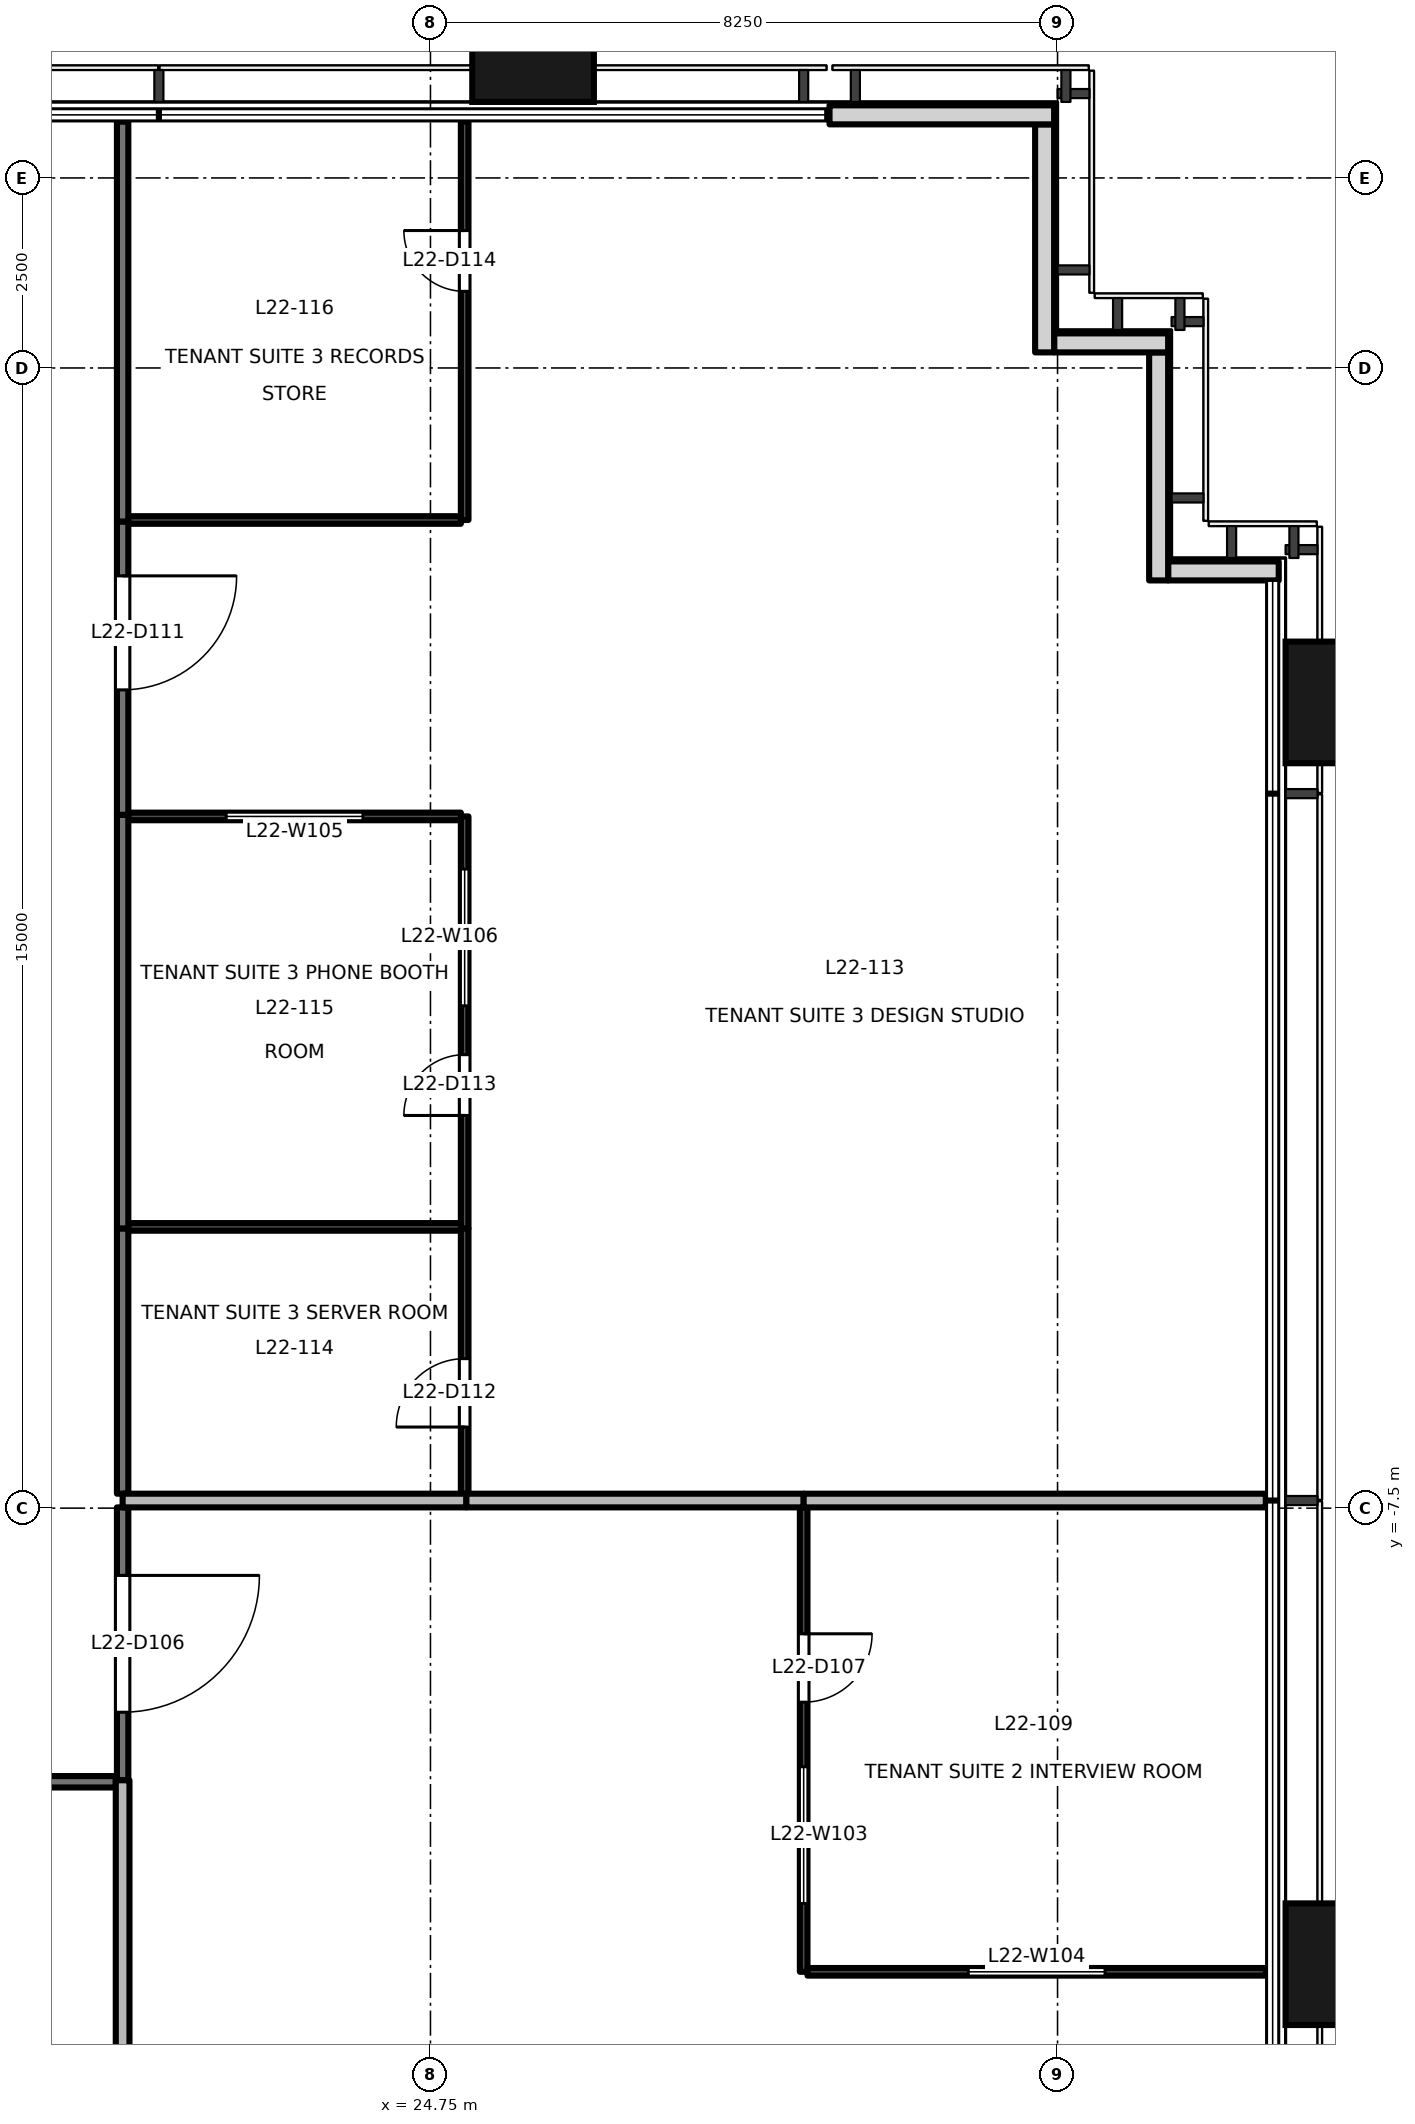
"""IFC4 building model, lengths in metres.
Left out: names, types, materials, properties, quantities, classifications, styles, units other than length and angle.
Written with IfcOpenShell. Run it as: python <this file> out.ifc"""

import sys

from ifc_helpers import new_model, si_unit, direction, frame, frame_2d, origin, origin_2d, place, context, subcontext, project, spatial, rectangle, extrude, element, fill, save


model = new_model("IFC4")
c1 = context("Model", 3, precision=1e-05, world=origin(), true_north=direction((0.0, 1.0)))
c2 = subcontext(c1, "Body", "Model", "MODEL_VIEW")
j1 = project(units=[si_unit("LENGTHUNIT", "METRE"), si_unit("PLANEANGLEUNIT", "RADIAN")], contexts=[c1])
p1 = place(None, origin())
s1 = spatial("IfcSite", under=j1, at=p1, CompositionType="ELEMENT")
p2 = place(p1, origin())
s2 = spatial("IfcBuilding", under=s1, at=p2, CompositionType="ELEMENT")
p3 = place(p2, frame((0.0, 0.0, 99.7)))
s3 = spatial("IfcBuildingStorey", under=s2, at=p3, CompositionType="ELEMENT", Elevation=99.7)
for number, where, z_axis, x_axis in (
    (1, (36.9, -13.5, -0.2), (0.0, 0.0, 1.0), (0.0, 1.0, 0.0)),
    (2, (36.9, 3.1, -0.2), (0.0, 0.0, 1.0), (0.0, 1.0, 0.0)),
    (3, (26.1, 11.9, -0.2), (0.0, 0.0, 1.0), (1.0, 0.0, 0.0)),
):
    element("IfcColumn", number, at=place(p3, frame(where, z_axis=z_axis, x_axis=x_axis)), inside=s3, PredefinedType="COLUMN", context=c2, shape_type="SweptSolid", body=[
        extrude(rectangle(XDim=1.6, YDim=1.8, at=origin_2d()), origin(), (0.0, 0.0, 1.0), 4.0),
    ])
p4 = place(p3, frame((35.91, 4.83, 0.0), z_axis=(0.0, 0.0, 1.0), x_axis=(-1.0, 0.0, 0.0)))
e4 = element("IfcWall", 4, at=p4, inside=s3, PredefinedType="SOLIDWALL", context=c2, shape_type="SweptSolid", body=[
    extrude(rectangle(XDim=1.455, YDim=0.25, at=frame_2d((0.728, 0.0))), origin(), (0.0, 0.0, 1.0), 3.8),
])
p5 = place(p3, frame((34.33, 4.705, 0.0), z_axis=(0.0, 0.0, 1.0), x_axis=(0.0, 1.0, 0.0)))
e5 = element("IfcWall", 5, at=p5, inside=s3, PredefinedType="SOLIDWALL", context=c2, shape_type="SweptSolid", body=[
    extrude(rectangle(XDim=3.0, YDim=0.25, at=frame_2d((1.5, 0.0))), origin(), (0.0, 0.0, 1.0), 3.8),
])
p6 = place(p3, frame((34.455, 7.83, 0.0), z_axis=(0.0, 0.0, 1.0), x_axis=(-1.0, 0.0, 0.0)))
e6 = element("IfcWall", 6, at=p6, inside=s3, PredefinedType="SOLIDWALL", context=c2, shape_type="SweptSolid", body=[
    extrude(rectangle(XDim=1.5, YDim=0.25, at=frame_2d((0.75, 0.0))), origin(), (0.0, 0.0, 1.0), 3.8),
])
p7 = place(p3, frame((32.83, 7.705, 0.0), z_axis=(0.0, 0.0, 1.0), x_axis=(0.0, 1.0, 0.0)))
e7 = element("IfcWall", 7, at=p7, inside=s3, PredefinedType="SOLIDWALL", context=c2, shape_type="SweptSolid", body=[
    extrude(rectangle(XDim=3.0, YDim=0.25, at=frame_2d((1.5, 0.0))), origin(), (0.0, 0.0, 1.0), 3.8),
])
p8 = place(p3, frame((32.955, 10.83, 0.0), z_axis=(0.0, 0.0, 1.0), x_axis=(-1.0, 0.0, 0.0)))
e8 = element("IfcWall", 8, at=p8, inside=s3, PredefinedType="SOLIDWALL", context=c2, shape_type="SweptSolid", body=[
    extrude(rectangle(XDim=2.955, YDim=0.25, at=frame_2d((1.478, 0.0))), origin(), (0.0, 0.0, 1.0), 3.8),
])
p9 = place(p3, frame((20.7, -7.49, 0.0), z_axis=(0.0, 0.0, 1.0), x_axis=(0.0, -1.0, 0.0)))
e9 = element("IfcWall", 9, at=p9, inside=s3, PredefinedType="PARTITIONING", context=c2, shape_type="SweptSolid", body=[
    extrude(rectangle(XDim=3.59, YDim=0.15, at=frame_2d((1.795, 0.0))), origin(), (0.0, 0.0, 1.0), 2.9),
])
p10 = place(p9, frame((0.895, 0.0, 0.0)))
e10 = element("IfcOpeningElement", 10, at=p10, cuts=e9, PredefinedType="OPENING", context=c2, shape_type="SweptSolid", body=[
    extrude(rectangle(XDim=1.8, YDim=2.1, at=frame_2d((0.9, 1.05))), frame((0.0, 0.085, 0.0), z_axis=(0.0, -1.0, 0.0), x_axis=(1.0, 0.0, 0.0)), (0.0, 0.0, 1.0), 0.171),
])
p11 = place(p3, frame((20.7, 5.48, 0.0), z_axis=(0.0, 0.0, 1.0), x_axis=(0.0, -1.0, 0.0)))
e11 = element("IfcWall", 11, at=p11, inside=s3, PredefinedType="PARTITIONING", context=c2, shape_type="SweptSolid", body=[
    extrude(rectangle(XDim=3.86, YDim=0.15, at=frame_2d((1.93, 0.0))), origin(), (0.0, 0.0, 1.0), 2.9),
])
p12 = place(p11, frame((0.715, 0.0, 0.0)))
e12 = element("IfcOpeningElement", 12, at=p12, cuts=e11, PredefinedType="OPENING", context=c2, shape_type="SweptSolid", body=[
    extrude(rectangle(XDim=1.5, YDim=2.1, at=frame_2d((0.75, 1.05))), frame((0.0, 0.085, 0.0), z_axis=(0.0, -1.0, 0.0), x_axis=(1.0, 0.0, 0.0)), (0.0, 0.0, 1.0), 0.171),
])
p13 = place(p3, frame((20.7, -3.82, 0.0), z_axis=(0.0, 0.0, 1.0), x_axis=(0.0, -1.0, 0.0)))
e13 = element("IfcWall", 13, at=p13, inside=s3, PredefinedType="PARTITIONING", context=c2, shape_type="SweptSolid", body=[
    extrude(rectangle(XDim=3.49, YDim=0.15, at=frame_2d((1.745, 0.0))), origin(), (0.0, 0.0, 1.0), 2.9),
])
p14 = place(p3, frame((20.7, 1.62, 0.0), z_axis=(0.0, 0.0, 1.0), x_axis=(0.0, -1.0, 0.0)))
e14 = element("IfcWall", 14, at=p14, inside=s3, PredefinedType="PARTITIONING", context=c2, shape_type="SweptSolid", body=[
    extrude(rectangle(XDim=5.44, YDim=0.15, at=frame_2d((2.72, 0.0))), origin(), (0.0, 0.0, 1.0), 2.9),
])
p15 = place(p3, frame((20.7, 10.74, 0.0), z_axis=(0.0, 0.0, 1.0), x_axis=(0.0, -1.0, 0.0)))
e15 = element("IfcWall", 15, at=p15, inside=s3, PredefinedType="PARTITIONING", context=c2, shape_type="SweptSolid", body=[
    extrude(rectangle(XDim=5.26, YDim=0.15, at=frame_2d((2.63, 0.0))), origin(), (0.0, 0.0, 1.0), 3.8),
])
p16 = place(p3, frame((20.61, -11.1, 0.0), z_axis=(0.0, 0.0, 1.0), x_axis=(-1.0, 0.0, 0.0)))
e16 = element("IfcWall", 16, at=p16, inside=s3, PredefinedType="PARTITIONING", context=c2, shape_type="SweptSolid", body=[
    extrude(rectangle(XDim=8.63, YDim=0.15, at=frame_2d((4.315, 0.0))), origin(), (0.0, 0.0, 1.0), 2.4),
])
p17 = place(p3, frame((29.66, -7.49, 0.0), z_axis=(0.0, 0.0, 1.0), x_axis=(0.0, -1.0, 0.0)))
e17 = element("IfcWall", 17, at=p17, inside=s3, PredefinedType="PARTITIONING", context=c2, shape_type="SweptSolid", body=[
    extrude(rectangle(XDim=6.11, YDim=0.1, at=frame_2d((3.055, 0.0))), origin(), (0.0, 0.0, 1.0), 2.9),
])
p18 = place(p17, frame((1.663, 0.0, 0.0)))
e18 = element("IfcOpeningElement", 18, at=p18, cuts=e17, PredefinedType="OPENING", context=c2, shape_type="SweptSolid", body=[
    extrude(rectangle(XDim=0.9, YDim=2.1, at=frame_2d((0.45, 1.05))), frame((0.0, 0.061, 0.0), z_axis=(0.0, -1.0, 0.0), x_axis=(1.0, 0.0, 0.0)), (0.0, 0.0, 1.0), 0.121),
])
p19 = place(p17, frame((3.412, 0.0, 0.9)))
e19 = element("IfcOpeningElement", 19, at=p19, cuts=e17, PredefinedType="OPENING", context=c2, shape_type="SweptSolid", body=[
    extrude(rectangle(XDim=1.8, YDim=1.2, at=frame_2d((0.9, 0.6))), frame((0.0, 0.061, 0.0), z_axis=(0.0, -1.0, 0.0), x_axis=(1.0, 0.0, 0.0)), (0.0, 0.0, 1.0), 0.121),
])
p20 = place(p3, frame((29.71, -13.6, 0.0), z_axis=(0.0, 0.0, 1.0), x_axis=(1.0, 0.0, 0.0)))
e20 = element("IfcWall", 20, at=p20, inside=s3, PredefinedType="PARTITIONING", context=c2, shape_type="SweptSolid", body=[
    extrude(rectangle(XDim=6.03, YDim=0.1, at=frame_2d((3.015, 0.0))), origin(), (0.0, 0.0, 1.0), 2.9),
])
p21 = place(p20, frame((2.115, 0.0, 0.9)))
e21 = element("IfcOpeningElement", 21, at=p21, cuts=e20, PredefinedType="OPENING", context=c2, shape_type="SweptSolid", body=[
    extrude(rectangle(XDim=1.8, YDim=1.2, at=frame_2d((0.9, 0.6))), frame((0.0, 0.061, 0.0), z_axis=(0.0, -1.0, 0.0), x_axis=(1.0, 0.0, 0.0)), (0.0, 0.0, 1.0), 0.121),
])
p22 = place(p3, frame((25.22, -7.4, 0.0), z_axis=(0.0, 0.0, 1.0), x_axis=(1.0, 0.0, 0.0)))
e22 = element("IfcWall", 22, at=p22, inside=s3, PredefinedType="PARTITIONING", context=c2, shape_type="SweptSolid", body=[
    extrude(rectangle(XDim=4.44, YDim=0.18, at=frame_2d((2.22, 0.0))), origin(), (0.0, 0.0, 1.0), 3.8),
])
p23 = place(p3, frame((20.7, -7.4, 0.0), z_axis=(0.0, 0.0, 1.0), x_axis=(1.0, 0.0, 0.0)))
e23 = element("IfcWall", 23, at=p23, inside=s3, PredefinedType="PARTITIONING", context=c2, shape_type="SweptSolid", body=[
    extrude(rectangle(XDim=4.52, YDim=0.18, at=frame_2d((2.26, 0.0))), origin(), (0.0, 0.0, 1.0), 3.8),
])
p24 = place(p3, frame((20.7, -15.92, 0.0), z_axis=(0.0, 0.0, 1.0), x_axis=(0.0, 1.0, 0.0)))
e24 = element("IfcWall", 24, at=p24, inside=s3, PredefinedType="PARTITIONING", context=c2, shape_type="SweptSolid", body=[
    extrude(rectangle(XDim=4.84, YDim=0.18, at=frame_2d((2.42, 0.0))), origin(), (0.0, 0.0, 1.0), 2.9),
])
p25 = place(p3, frame((29.66, -7.4, 0.0), z_axis=(0.0, 0.0, 1.0), x_axis=(1.0, 0.0, 0.0)))
e25 = element("IfcWall", 25, at=p25, inside=s3, PredefinedType="PARTITIONING", context=c2, shape_type="SweptSolid", body=[
    extrude(rectangle(XDim=6.08, YDim=0.18, at=frame_2d((3.04, 0.0))), origin(), (0.0, 0.0, 1.0), 3.8),
])
p26 = place(p3, frame((25.2, -7.31, 0.0), z_axis=(0.0, 0.0, 1.0), x_axis=(0.0, 1.0, 0.0)))
e26 = element("IfcWall", 26, at=p26, inside=s3, PredefinedType="PARTITIONING", context=c2, shape_type="SweptSolid", body=[
    extrude(rectangle(XDim=3.49, YDim=0.1, at=frame_2d((1.745, 0.0))), origin(), (0.0, 0.0, 1.0), 2.9),
])
p27 = place(p26, frame((0.877, 0.0, 0.0)))
e27 = element("IfcOpeningElement", 27, at=p27, cuts=e26, PredefinedType="OPENING", context=c2, shape_type="SweptSolid", body=[
    extrude(rectangle(XDim=0.9, YDim=2.1, at=frame_2d((0.45, 1.05))), frame((0.0, 0.061, 0.0), z_axis=(0.0, -1.0, 0.0), x_axis=(1.0, 0.0, 0.0)), (0.0, 0.0, 1.0), 0.121),
])
p28 = place(p3, frame((25.15, 1.6, 0.0), z_axis=(0.0, 0.0, 1.0), x_axis=(-1.0, 0.0, 0.0)))
e28 = element("IfcWall", 28, at=p28, inside=s3, PredefinedType="PARTITIONING", context=c2, shape_type="SweptSolid", body=[
    extrude(rectangle(XDim=4.375, YDim=0.1, at=frame_2d((2.188, 0.0))), origin(), (0.0, 0.0, 1.0), 3.8),
])
p29 = place(p28, frame((1.288, 0.0, 0.9)))
e29 = element("IfcOpeningElement", 29, at=p29, cuts=e28, PredefinedType="OPENING", context=c2, shape_type="SweptSolid", body=[
    extrude(rectangle(XDim=1.8, YDim=1.2, at=frame_2d((0.9, 0.6))), frame((0.0, 0.061, 0.0), z_axis=(0.0, -1.0, 0.0), x_axis=(1.0, 0.0, 0.0)), (0.0, 0.0, 1.0), 0.121),
])
p30 = place(p3, frame((25.2, -3.82, 0.0), z_axis=(0.0, 0.0, 1.0), x_axis=(0.0, 1.0, 0.0)))
e30 = element("IfcWall", 30, at=p30, inside=s3, PredefinedType="PARTITIONING", context=c2, shape_type="SweptSolid", body=[
    extrude(rectangle(XDim=5.42, YDim=0.1, at=frame_2d((2.71, 0.0))), origin(), (0.0, 0.0, 1.0), 2.9),
])
p31 = place(p30, frame((1.486, 0.0, 0.0)))
e31 = element("IfcOpeningElement", 31, at=p31, cuts=e30, PredefinedType="OPENING", context=c2, shape_type="SweptSolid", body=[
    extrude(rectangle(XDim=0.8, YDim=2.1, at=frame_2d((0.4, 1.05))), frame((0.0, 0.061, 0.0), z_axis=(0.0, -1.0, 0.0), x_axis=(1.0, 0.0, 0.0)), (0.0, 0.0, 1.0), 0.121),
])
p32 = place(p30, frame((2.928, 0.0, 0.9)))
e32 = element("IfcOpeningElement", 32, at=p32, cuts=e30, PredefinedType="OPENING", context=c2, shape_type="SweptSolid", body=[
    extrude(rectangle(XDim=1.8, YDim=1.2, at=frame_2d((0.9, 0.6))), frame((0.0, 0.061, 0.0), z_axis=(0.0, -1.0, 0.0), x_axis=(1.0, 0.0, 0.0)), (0.0, 0.0, 1.0), 0.121),
])
p33 = place(p3, frame((20.775, 5.5, 0.0), z_axis=(0.0, 0.0, 1.0), x_axis=(1.0, 0.0, 0.0)))
e33 = element("IfcWall", 33, at=p33, inside=s3, PredefinedType="PARTITIONING", context=c2, shape_type="SweptSolid", body=[
    extrude(rectangle(XDim=4.375, YDim=0.1, at=frame_2d((2.188, 0.0))), origin(), (0.0, 0.0, 1.0), 3.8),
])
p34 = place(p3, frame((25.2, 5.5, 0.0), z_axis=(0.0, 0.0, 1.0), x_axis=(0.0, 1.0, 0.0)))
e34 = element("IfcWall", 34, at=p34, inside=s3, PredefinedType="PARTITIONING", context=c2, shape_type="SweptSolid", body=[
    extrude(rectangle(XDim=5.24, YDim=0.1, at=frame_2d((2.62, 0.0))), origin(), (0.0, 0.0, 1.0), 3.8),
])
p35 = place(p34, frame((3.008, 0.0, 0.0)))
e35 = element("IfcOpeningElement", 35, at=p35, cuts=e34, PredefinedType="OPENING", context=c2, shape_type="SweptSolid", body=[
    extrude(rectangle(XDim=0.8, YDim=2.1, at=frame_2d((0.4, 1.05))), frame((0.0, 0.061, 0.0), z_axis=(0.0, -1.0, 0.0), x_axis=(1.0, 0.0, 0.0)), (0.0, 0.0, 1.0), 0.121),
])
p36 = place(p3, frame((20.775, -3.8, 0.0), z_axis=(0.0, 0.0, 1.0), x_axis=(1.0, 0.0, 0.0)))
e36 = element("IfcWall", 36, at=p36, inside=s3, PredefinedType="PARTITIONING", context=c2, shape_type="SweptSolid", body=[
    extrude(rectangle(XDim=4.375, YDim=0.1, at=frame_2d((2.188, 0.0))), origin(), (0.0, 0.0, 1.0), 3.8),
])
p37 = place(p10, origin())
e37 = element("IfcDoor", 37, at=p37, inside=s3, OperationType="DOUBLE_DOOR_SINGLE_SWING", PredefinedType="DOOR", context=c2, shape_type="SweptSolid", body=[
    extrude(rectangle(XDim=1.8, YDim=2.1, at=frame_2d((0.9, 1.05))), frame((0.0, 0.025, 0.0), z_axis=(0.0, -1.0, 0.0), x_axis=(1.0, 0.0, 0.0)), (0.0, 0.0, 1.0), 0.05),
])
fill(e10, e37)
p38 = place(p18, origin())
e38 = element("IfcDoor", 38, at=p38, inside=s3, OperationType="SINGLE_SWING_LEFT", PredefinedType="DOOR", context=c2, shape_type="SweptSolid", body=[
    extrude(rectangle(XDim=0.9, YDim=2.1, at=frame_2d((0.45, 1.05))), frame((0.0, 0.025, 0.0), z_axis=(0.0, -1.0, 0.0), x_axis=(1.0, 0.0, 0.0)), (0.0, 0.0, 1.0), 0.05),
])
fill(e18, e38)
p39 = place(p12, origin())
e39 = element("IfcDoor", 39, at=p39, inside=s3, OperationType="DOUBLE_DOOR_SINGLE_SWING", PredefinedType="DOOR", context=c2, shape_type="SweptSolid", body=[
    extrude(rectangle(XDim=1.5, YDim=2.1, at=frame_2d((0.75, 1.05))), frame((0.0, 0.025, 0.0), z_axis=(0.0, -1.0, 0.0), x_axis=(1.0, 0.0, 0.0)), (0.0, 0.0, 1.0), 0.05),
])
fill(e12, e39)
p40 = place(p27, origin())
e40 = element("IfcDoor", 40, at=p40, inside=s3, OperationType="SINGLE_SWING_LEFT", PredefinedType="DOOR", context=c2, shape_type="SweptSolid", body=[
    extrude(rectangle(XDim=0.9, YDim=2.1, at=frame_2d((0.45, 1.05))), frame((0.0, 0.025, 0.0), z_axis=(0.0, -1.0, 0.0), x_axis=(1.0, 0.0, 0.0)), (0.0, 0.0, 1.0), 0.05),
])
fill(e27, e40)
p41 = place(p31, origin())
e41 = element("IfcDoor", 41, at=p41, inside=s3, OperationType="SINGLE_SWING_LEFT", PredefinedType="DOOR", context=c2, shape_type="SweptSolid", body=[
    extrude(rectangle(XDim=0.8, YDim=2.1, at=frame_2d((0.4, 1.05))), frame((0.0, 0.025, 0.0), z_axis=(0.0, -1.0, 0.0), x_axis=(1.0, 0.0, 0.0)), (0.0, 0.0, 1.0), 0.05),
])
fill(e31, e41)
p42 = place(p35, origin())
e42 = element("IfcDoor", 42, at=p42, inside=s3, OperationType="SINGLE_SWING_RIGHT", PredefinedType="DOOR", context=c2, shape_type="SweptSolid", body=[
    extrude(rectangle(XDim=0.8, YDim=2.1, at=frame_2d((0.4, 1.05))), frame((0.0, 0.025, 0.0), z_axis=(0.0, -1.0, 0.0), x_axis=(1.0, 0.0, 0.0)), (0.0, 0.0, 1.0), 0.05),
])
fill(e35, e42)
p43 = place(p19, origin())
e43 = element("IfcWindow", 43, at=p43, inside=s3, PartitioningType="SINGLE_PANEL", PredefinedType="WINDOW", context=c2, shape_type="SweptSolid", body=[
    extrude(rectangle(XDim=1.8, YDim=1.2, at=frame_2d((0.9, 0.6))), frame((0.0, 0.03, 0.0), z_axis=(0.0, -1.0, 0.0), x_axis=(1.0, 0.0, 0.0)), (0.0, 0.0, 1.0), 0.06),
])
fill(e19, e43)
p44 = place(p21, origin())
e44 = element("IfcWindow", 44, at=p44, inside=s3, PartitioningType="SINGLE_PANEL", PredefinedType="WINDOW", context=c2, shape_type="SweptSolid", body=[
    extrude(rectangle(XDim=1.8, YDim=1.2, at=frame_2d((0.9, 0.6))), frame((0.0, 0.03, 0.0), z_axis=(0.0, -1.0, 0.0), x_axis=(1.0, 0.0, 0.0)), (0.0, 0.0, 1.0), 0.06),
])
fill(e21, e44)
p45 = place(p29, origin())
e45 = element("IfcWindow", 45, at=p45, inside=s3, PartitioningType="SINGLE_PANEL", PredefinedType="WINDOW", context=c2, shape_type="SweptSolid", body=[
    extrude(rectangle(XDim=1.8, YDim=1.2, at=frame_2d((0.9, 0.6))), frame((0.0, 0.03, 0.0), z_axis=(0.0, -1.0, 0.0), x_axis=(1.0, 0.0, 0.0)), (0.0, 0.0, 1.0), 0.06),
])
fill(e29, e45)
p46 = place(p32, origin())
e46 = element("IfcWindow", 46, at=p46, inside=s3, PartitioningType="SINGLE_PANEL", PredefinedType="WINDOW", context=c2, shape_type="SweptSolid", body=[
    extrude(rectangle(XDim=1.8, YDim=1.2, at=frame_2d((0.9, 0.6))), frame((0.0, 0.03, 0.0), z_axis=(0.0, -1.0, 0.0), x_axis=(1.0, 0.0, 0.0)), (0.0, 0.0, 1.0), 0.06),
])
fill(e32, e46)
save(model, sys.argv[1])
